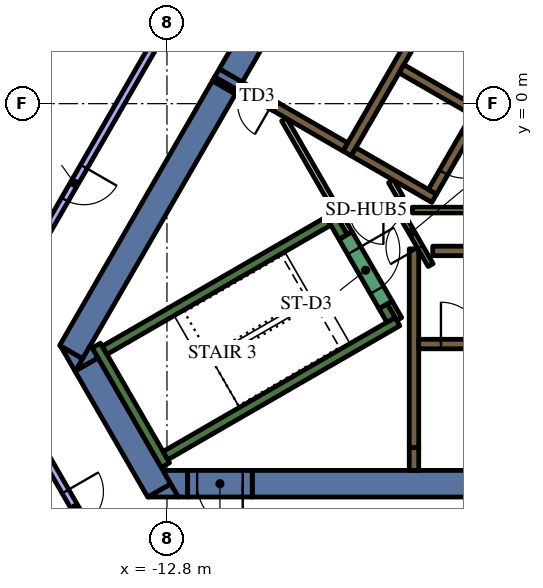
"""IFC4 building model, lengths in metres.
Left out: names, types, materials, properties, quantities, classifications, styles, units other than length and angle.
Written with IfcOpenShell. Run it as: python <this file> out.ifc"""

import sys

from ifc_helpers import new_model, si_unit, direction, frame, frame_2d, origin, place, context, subcontext, project, spatial, polyline, rectangle, outline, extrude, element, fill, save


model = new_model("IFC4")
c1 = context("Model", 3, precision=1e-05, world=origin(), true_north=direction((0.0, 1.0)))
c2 = subcontext(c1, "Body", "Model", "MODEL_VIEW")
j1 = project(units=[si_unit("LENGTHUNIT", "METRE"), si_unit("PLANEANGLEUNIT", "RADIAN")], contexts=[c1])
p1 = place(None, origin())
s1 = spatial("IfcSite", under=j1, at=p1, CompositionType="ELEMENT")
p2 = place(p1, origin())
s2 = spatial("IfcBuilding", under=s1, at=p2, CompositionType="ELEMENT")
p3 = place(p2, frame((0.0, 0.0, 210.0)))
s3 = spatial("IfcBuildingStorey", under=s2, at=p3, CompositionType="ELEMENT", Elevation=210.0)
p4 = place(p3, frame((-11.301, 0.426, 0.0), z_axis=(0.0, 0.0, 1.0), x_axis=(0.50111559984, 0.865380353138, 0.0)))
e1 = element("IfcWall", 1, at=p4, inside=s3, PredefinedType="SOLIDWALL", context=c2, shape_type="SweptSolid", body=[
    extrude(rectangle(XDim=0.121, YDim=0.7, at=frame_2d((0.061, 0.0))), origin(), (0.0, 0.0, 1.0), 4.2),
])
p5 = place(p3, frame((-15.321, -6.537, 0.0), z_axis=(0.0, 0.0, 1.0), x_axis=(0.500000268222, 0.866025248926, 0.0)))
e2 = element("IfcWall", 2, at=p5, inside=s3, PredefinedType="SOLIDWALL", context=c2, shape_type="SweptSolid", body=[
    extrude(rectangle(XDim=8.038, YDim=0.7, at=frame_2d((4.019, 0.0))), origin(), (0.0, 0.0, 1.0), 4.2),
])
p6 = place(p3, origin())
e3 = element("IfcWall", 3, at=p6, inside=s3, PredefinedType="SOLIDWALL", context=c2, shape_type="SweptSolid", body=[
    extrude(outline(polyline([(-15.213, -7.05), (-15.601, -6.378), (-15.019, -6.714), (-15.213, -7.05)])), origin(), (0.0, 0.0, 1.0), 4.2),
])
p7 = place(p3, frame((-4.696, 11.867, 0.0), z_axis=(0.0, 0.0, 1.0), x_axis=(-0.500003726532, -0.866023252259, 0.0)))
e4 = element("IfcWall", 4, at=p7, inside=s3, PredefinedType="SOLIDWALL", context=c2, shape_type="SweptSolid", body=[
    extrude(rectangle(XDim=12.848, YDim=0.7, at=frame_2d((6.424, 0.0))), origin(), (0.0, 0.0, 1.0), 4.2),
])
e5 = element("IfcWall", 5, at=p6, inside=s3, PredefinedType="SOLIDWALL", context=c2, shape_type="SweptSolid", body=[
    extrude(outline(polyline([(-11.543, 0.708), (-11.424, 0.914), (-10.843, 0.578), (-10.962, 0.372), (-11.543, 0.708)])), origin(), (0.0, 0.0, 1.0), 4.2),
])
p8 = place(p3, frame((-14.917, -6.863, 0.0), z_axis=(0.0, 0.0, 1.0), x_axis=(0.499972675833, -0.866041178825, 0.0)))
e6 = element("IfcWall", 6, at=p8, inside=s3, PredefinedType="SOLIDWALL", context=c2, shape_type="SweptSolid", body=[
    extrude(rectangle(XDim=3.829, YDim=0.7, at=frame_2d((1.915, 0.0))), origin(), (0.0, 0.0, 1.0), 4.2),
])
e7 = element("IfcWall", 7, at=p6, inside=s3, PredefinedType="SOLIDWALL", context=c2, shape_type="SweptSolid", body=[
    extrude(outline(polyline([(-14.809, -6.35), (-14.615, -6.686), (-15.197, -7.022), (-14.809, -6.35)])), origin(), (0.0, 0.0, 1.0), 4.2),
])
e8 = element("IfcWall", 8, at=p6, inside=s3, PredefinedType="SOLIDWALL", context=c2, shape_type="SweptSolid", body=[
    extrude(outline(polyline([(-12.5, -10.35), (-13.296, -10.35), (-12.698, -10.005), (-12.5, -10.35)])), origin(), (0.0, 0.0, 1.0), 4.2),
])
e9 = element("IfcWall", 9, at=p6, inside=s3, PredefinedType="SOLIDWALL", context=c2, shape_type="SweptSolid", body=[
    extrude(outline(polyline([(-12.257, -10.35), (-12.5, -10.35), (-12.904, -9.65), (-12.257, -9.65), (-12.257, -10.35)])), origin(), (0.0, 0.0, 1.0), 4.2),
])
p9 = place(p3, frame((-10.556, -10.0, 0.0), z_axis=(0.0, 0.0, 1.0), x_axis=(1.0, 0.0, 0.0)))
e10 = element("IfcWall", 10, at=p9, inside=s3, PredefinedType="SOLIDWALL", context=c2, shape_type="SweptSolid", body=[
    extrude(rectangle(XDim=19.461, YDim=0.7, at=frame_2d((9.73, 0.0))), origin(), (0.0, 0.0, 1.0), 4.2),
])
p10 = place(p3, frame((-12.84, -9.511, 0.0), z_axis=(0.0, 0.0, 1.0), x_axis=(-0.500048121057, 0.865997619297, 0.0)))
e11 = element("IfcWall", 11, at=p10, inside=s3, PredefinedType="SOLIDWALL", context=c2, shape_type="SweptSolid", body=[
    extrude(rectangle(XDim=3.634, YDim=0.25, at=frame_2d((1.817, 0.0))), origin(), (0.0, 0.0, 1.0), 4.2),
])
p11 = place(p3, frame((-14.44, -6.49, 0.0), z_axis=(0.0, 0.0, 1.0), x_axis=(0.866022966069, 0.500004222222, 0.0)))
e12 = element("IfcWall", 12, at=p11, inside=s3, PredefinedType="SOLIDWALL", context=c2, shape_type="SweptSolid", body=[
    extrude(rectangle(XDim=6.8, YDim=0.25, at=frame_2d((3.4, 0.0))), origin(), (0.0, 0.0, 1.0), 4.2),
])
p12 = place(p3, frame((-8.163, -3.511, 0.0), z_axis=(0.0, 0.0, 1.0), x_axis=(-0.499994068514, 0.866028828302, 0.0)))
e13 = element("IfcWall", 13, at=p12, inside=s3, PredefinedType="SOLIDWALL", context=c2, shape_type="SweptSolid", body=[
    extrude(rectangle(XDim=0.674, YDim=0.25, at=frame_2d((0.337, 0.0))), origin(), (0.0, 0.0, 1.0), 4.2),
])
p13 = place(p3, frame((-12.84, -9.261, 0.0), z_axis=(0.0, 0.0, 1.0), x_axis=(0.866016039709, 0.500016218704, 0.0)))
e14 = element("IfcWall", 14, at=p13, inside=s3, PredefinedType="SOLIDWALL", context=c2, shape_type="SweptSolid", body=[
    extrude(rectangle(XDim=7.05, YDim=0.25, at=frame_2d((3.525, 0.0))), origin(), (0.0, 0.0, 1.0), 4.2),
])
p14 = place(p3, frame((-6.905, -5.69, 0.0), z_axis=(0.0, 0.0, 1.0), x_axis=(-0.499993700073, 0.866029041019, 0.0)))
e15 = element("IfcWall", 15, at=p14, inside=s3, PredefinedType="SOLIDWALL", context=c2, shape_type="SweptSolid", body=[
    extrude(rectangle(XDim=0.416, YDim=0.25, at=frame_2d((0.208, 0.0))), origin(), (0.0, 0.0, 1.0), 4.2),
])
p15 = place(p3, frame((-6.3, -9.05, 0.0), z_axis=(0.0, 0.0, 1.0), x_axis=(0.0, 1.0, 0.0)))
e16 = element("IfcWall", 16, at=p15, inside=s3, PredefinedType="SOLIDWALL", context=c2, shape_type="SweptSolid", body=[
    extrude(rectangle(XDim=5.23, YDim=0.25, at=frame_2d((2.615, 0.0))), origin(), (0.0, 0.0, 1.0), 4.2),
])
p16 = place(p3, frame((-6.3, -9.052, 0.0), z_axis=(0.0, 0.0, 1.0), x_axis=(0.0, -1.0, 0.0)))
e17 = element("IfcWall", 17, at=p16, inside=s3, PredefinedType="SOLIDWALL", context=c2, shape_type="SweptSolid", body=[
    extrude(rectangle(XDim=0.598, YDim=0.25, at=frame_2d((0.299, 0.0))), origin(), (0.0, 0.0, 1.0), 4.2),
])
p17 = place(p3, frame((-5.806, -3.875, 0.0), z_axis=(0.0, 0.0, 1.0), x_axis=(1.0, 0.0, 0.0)))
e18 = element("IfcWall", 18, at=p17, inside=s3, PredefinedType="SOLIDWALL", context=c2, shape_type="SweptSolid", body=[
    extrude(rectangle(XDim=12.231, YDim=0.25, at=frame_2d((6.116, 0.0))), origin(), (0.0, 0.0, 1.0), 4.2),
])
p18 = place(p3, frame((-8.06, -1.311, 0.0), z_axis=(0.0, 0.0, 1.0), x_axis=(0.50000273126, 0.866023826885, 0.0)))
e19 = element("IfcWall", 19, at=p18, inside=s3, PredefinedType="SOLIDWALL", context=c2, shape_type="SweptSolid", body=[
    extrude(rectangle(XDim=10.33, YDim=0.25, at=frame_2d((5.165, 0.0))), origin(), (0.0, 0.0, 1.0), 4.2),
])
p19 = place(p3, frame((-4.724, -0.182, 0.0), z_axis=(0.0, 0.0, 1.0), x_axis=(-0.866008176907, 0.50002983664, 0.0)))
e20 = element("IfcWall", 20, at=p19, inside=s3, PredefinedType="SOLIDWALL", context=c2, shape_type="SweptSolid", body=[
    extrude(rectangle(XDim=2.2, YDim=0.25, at=frame_2d((1.1, 0.0))), origin(), (0.0, 0.0, 1.0), 4.2),
])
p20 = place(p3, frame((-7.889, -1.265, 0.0), z_axis=(0.0, 0.0, 1.0), x_axis=(0.866057815567, -0.499943856944, 0.0)))
e21 = element("IfcWall", 21, at=p20, inside=s3, PredefinedType="SOLIDWALL", context=c2, shape_type="SweptSolid", body=[
    extrude(rectangle(XDim=2.45, YDim=0.25, at=frame_2d((1.225, 0.0))), origin(), (0.0, 0.0, 1.0), 4.2),
])
p21 = place(p3, frame((-9.95, -0.075, 0.0), z_axis=(0.0, 0.0, 1.0), x_axis=(0.865962177421, -0.500109495288, 0.0)))
e22 = element("IfcWall", 22, at=p21, inside=s3, PredefinedType="SOLIDWALL", context=c2, shape_type="SweptSolid", body=[
    extrude(rectangle(XDim=2.129, YDim=0.25, at=frame_2d((1.065, 0.0))), origin(), (0.0, 0.0, 1.0), 4.2),
])
p22 = place(p3, frame((-9.718, -0.417, 0.0), z_axis=(0.0, 0.0, 1.0), x_axis=(0.499966538646, -0.866044721844, 0.0)))
e23 = element("IfcWall", 23, at=p22, inside=s3, PredefinedType="PARTITIONING", context=c2, shape_type="SweptSolid", body=[
    extrude(rectangle(XDim=2.511, YDim=0.15, at=frame_2d((1.255, 0.0))), origin(), (0.0, 0.0, 1.0), 3.45),
])
p23 = place(p3, frame((1.438, -2.8, 0.0), z_axis=(0.0, 0.0, 1.0), x_axis=(-1.0, 0.0, 0.0)))
e24 = element("IfcWall", 24, at=p23, inside=s3, PredefinedType="PARTITIONING", context=c2, shape_type="SweptSolid", body=[
    extrude(rectangle(XDim=7.781, YDim=0.15, at=frame_2d((3.891, 0.0))), origin(), (0.0, 0.0, 1.0), 3.45),
])
p24 = place(p3, frame((-6.653, -2.477, 0.0), z_axis=(0.0, 0.0, 1.0), x_axis=(-0.500002592159, 0.866023907196, 0.0)))
e25 = element("IfcWall", 25, at=p24, inside=s3, PredefinedType="PARTITIONING", context=c2, shape_type="SweptSolid", body=[
    extrude(rectangle(XDim=0.503, YDim=0.15, at=frame_2d((0.251, 0.0))), origin(), (0.0, 0.0, 1.0), 3.45),
])
p25 = place(p3, frame((-7.99, -3.412, 0.0), z_axis=(0.0, 0.0, 1.0), x_axis=(-0.499858525911, 0.866107068482, 0.0)))
e26 = element("IfcWall", 26, at=p25, inside=s3, PredefinedType="PARTITIONING", context=c2, shape_type="SweptSolid", body=[
    extrude(rectangle(XDim=0.466, YDim=0.15, at=frame_2d((0.233, 0.0))), origin(), (0.0, 0.0, 1.0), 3.45),
])
p26 = place(p3, frame((-6.94, -5.23, 0.0), z_axis=(0.0, 0.0, 1.0), x_axis=(0.499834152157, -0.86612113491, 0.0)))
e27 = element("IfcWall", 27, at=p26, inside=s3, PredefinedType="PARTITIONING", context=c2, shape_type="SweptSolid", body=[
    extrude(rectangle(XDim=0.505, YDim=0.15, at=frame_2d((0.252, 0.0))), origin(), (0.0, 0.0, 1.0), 4.2),
])
p27 = place(p3, frame((-6.175, -6.325, 0.0), z_axis=(0.0, 0.0, 1.0), x_axis=(1.0, 0.0, 0.0)))
e28 = element("IfcWall", 28, at=p27, inside=s3, PredefinedType="SOLIDWALL", context=c2, shape_type="SweptSolid", body=[
    extrude(rectangle(XDim=12.35, YDim=0.25, at=frame_2d((6.175, 0.0))), origin(), (0.0, 0.0, 1.0), 4.2),
])
p28 = place(p27, frame((0.585, 0.0, 0.0)))
e29 = element("IfcOpeningElement", 29, at=p28, cuts=e28, PredefinedType="OPENING", context=c2, shape_type="SweptSolid", body=[
    extrude(rectangle(XDim=1.1, YDim=2.1, at=frame_2d((0.55, 1.05))), frame((0.0, 0.135, 0.0), z_axis=(0.0, -1.0, 0.0), x_axis=(1.0, 0.0, 0.0)), (0.0, 0.0, 1.0), 0.27),
])
p29 = place(p27, frame((3.105, 0.0, 0.0)))
e30 = element("IfcOpeningElement", 30, at=p29, cuts=e28, PredefinedType="OPENING", context=c2, shape_type="SweptSolid", body=[
    extrude(rectangle(XDim=1.1, YDim=2.1, at=frame_2d((0.55, 1.05))), frame((0.0, 0.135, 0.0), z_axis=(0.0, -1.0, 0.0), x_axis=(1.0, 0.0, 0.0)), (0.0, 0.0, 1.0), 0.27),
])
p30 = place(p27, frame((5.625, 0.0, 0.0)))
e31 = element("IfcOpeningElement", 31, at=p30, cuts=e28, PredefinedType="OPENING", context=c2, shape_type="SweptSolid", body=[
    extrude(rectangle(XDim=1.1, YDim=2.1, at=frame_2d((0.55, 1.05))), frame((0.0, 0.135, 0.0), z_axis=(0.0, -1.0, 0.0), x_axis=(1.0, 0.0, 0.0)), (0.0, 0.0, 1.0), 0.27),
])
p31 = place(p27, frame((8.145, 0.0, 0.0)))
e32 = element("IfcOpeningElement", 32, at=p31, cuts=e28, PredefinedType="OPENING", context=c2, shape_type="SweptSolid", body=[
    extrude(rectangle(XDim=1.1, YDim=2.1, at=frame_2d((0.55, 1.05))), frame((0.0, 0.135, 0.0), z_axis=(0.0, -1.0, 0.0), x_axis=(1.0, 0.0, 0.0)), (0.0, 0.0, 1.0), 0.27),
])
p32 = place(p27, frame((10.665, 0.0, 0.0)))
e33 = element("IfcOpeningElement", 33, at=p32, cuts=e28, PredefinedType="OPENING", context=c2, shape_type="SweptSolid", body=[
    extrude(rectangle(XDim=1.1, YDim=2.1, at=frame_2d((0.55, 1.05))), frame((0.0, 0.135, 0.0), z_axis=(0.0, -1.0, 0.0), x_axis=(1.0, 0.0, 0.0)), (0.0, 0.0, 1.0), 0.27),
])
p33 = place(p3, frame((-0.898, 6.194, 0.0), z_axis=(0.0, 0.0, 1.0), x_axis=(-0.499996202215, -0.866027596426, 0.0)))
e34 = element("IfcWall", 34, at=p33, inside=s3, PredefinedType="SOLIDWALL", context=c2, shape_type="SweptSolid", body=[
    extrude(rectangle(XDim=9.83, YDim=0.25, at=frame_2d((4.915, 0.0))), origin(), (0.0, 0.0, 1.0), 4.2),
])
p34 = place(p33, frame((0.585, 0.0, 0.0)))
e35 = element("IfcOpeningElement", 35, at=p34, cuts=e34, PredefinedType="OPENING", context=c2, shape_type="SweptSolid", body=[
    extrude(rectangle(XDim=1.1, YDim=2.1, at=frame_2d((0.55, 1.05))), frame((0.0, 0.135, 0.0), z_axis=(0.0, -1.0, 0.0), x_axis=(1.0, 0.0, 0.0)), (0.0, 0.0, 1.0), 0.27),
])
p35 = place(p33, frame((3.105, 0.0, 0.0)))
e36 = element("IfcOpeningElement", 36, at=p35, cuts=e34, PredefinedType="OPENING", context=c2, shape_type="SweptSolid", body=[
    extrude(rectangle(XDim=1.1, YDim=2.1, at=frame_2d((0.55, 1.05))), frame((0.0, 0.135, 0.0), z_axis=(0.0, -1.0, 0.0), x_axis=(1.0, 0.0, 0.0)), (0.0, 0.0, 1.0), 0.27),
])
p36 = place(p33, frame((5.625, 0.0, 0.0)))
e37 = element("IfcOpeningElement", 37, at=p36, cuts=e34, PredefinedType="OPENING", context=c2, shape_type="SweptSolid", body=[
    extrude(rectangle(XDim=1.1, YDim=2.1, at=frame_2d((0.55, 1.05))), frame((0.0, 0.135, 0.0), z_axis=(0.0, -1.0, 0.0), x_axis=(1.0, 0.0, 0.0)), (0.0, 0.0, 1.0), 0.27),
])
p37 = place(p33, frame((8.145, 0.0, 0.0)))
e38 = element("IfcOpeningElement", 38, at=p37, cuts=e34, PredefinedType="OPENING", context=c2, shape_type="SweptSolid", body=[
    extrude(rectangle(XDim=1.1, YDim=2.1, at=frame_2d((0.55, 1.05))), frame((0.0, 0.135, 0.0), z_axis=(0.0, -1.0, 0.0), x_axis=(1.0, 0.0, 0.0)), (0.0, 0.0, 1.0), 0.27),
])
p38 = place(p3, frame((-8.098, -3.474, 0.0), z_axis=(0.0, 0.0, 1.0), x_axis=(0.49994051562, -0.866059744384, 0.0)))
e39 = element("IfcWall", 39, at=p38, inside=s3, PredefinedType="SOLIDWALL", context=c2, shape_type="SweptSolid", body=[
    extrude(rectangle(XDim=2.1, YDim=0.4, at=frame_2d((1.05, 0.0))), origin(), (0.0, 0.0, 1.0), 4.2),
])
p39 = place(p38, frame((0.45, 0.0, 0.0)))
e40 = element("IfcOpeningElement", 40, at=p39, cuts=e39, PredefinedType="OPENING", context=c2, shape_type="SweptSolid", body=[
    extrude(rectangle(XDim=1.2, YDim=2.1, at=frame_2d((0.6, 1.05))), frame((0.0, 0.21, 0.0), z_axis=(0.0, -1.0, 0.0), x_axis=(1.0, 0.0, 0.0)), (0.0, 0.0, 1.0), 0.42),
])
p40 = place(p3, frame((-5.861, -4.248, 0.0), z_axis=(0.0, 0.0, 1.0), x_axis=(-0.500043646338, 0.866000203093, 0.0)))
e41 = element("IfcWall", 41, at=p40, inside=s3, PredefinedType="PARTITIONING", context=c2, shape_type="SweptSolid", body=[
    extrude(rectangle(XDim=1.93, YDim=0.15, at=frame_2d((0.965, 0.0))), origin(), (0.0, 0.0, 1.0), 4.2),
])
p41 = place(p40, frame((0.55, 0.0, 0.0)))
e42 = element("IfcOpeningElement", 42, at=p41, cuts=e41, PredefinedType="OPENING", context=c2, shape_type="SweptSolid", body=[
    extrude(rectangle(XDim=0.9, YDim=2.1, at=frame_2d((0.45, 1.05))), frame((0.0, 0.085, 0.0), z_axis=(0.0, -1.0, 0.0), x_axis=(1.0, 0.0, 0.0)), (0.0, 0.0, 1.0), 0.17),
])
p42 = place(p3, frame((-10.556, -10.0, 0.0), z_axis=(0.0, 0.0, 1.0), x_axis=(-1.0, 0.0, 0.0)))
e43 = element("IfcWall", 43, at=p42, inside=s3, PredefinedType="SOLIDWALL", context=c2, shape_type="SweptSolid", body=[
    extrude(rectangle(XDim=1.7, YDim=0.7, at=frame_2d((0.85, 0.0))), origin(), (0.0, 0.0, 1.0), 4.2),
])
p43 = place(p42, frame((0.25, 0.0, 0.0)))
e44 = element("IfcOpeningElement", 44, at=p43, cuts=e43, PredefinedType="OPENING", context=c2, shape_type="SweptSolid", body=[
    extrude(rectangle(XDim=1.2, YDim=2.1, at=frame_2d((0.6, 1.05))), frame((0.0, 0.36, 0.0), z_axis=(0.0, -1.0, 0.0), x_axis=(1.0, 0.0, 0.0)), (0.0, 0.0, 1.0), 0.72),
])
p44 = place(p3, frame((-6.655, -2.8, 0.0), z_axis=(0.0, 0.0, 1.0), x_axis=(-1.0, 0.0, 0.0)))
e45 = element("IfcWall", 45, at=p44, inside=s3, PredefinedType="PARTITIONING", context=c2, shape_type="SweptSolid", body=[
    extrude(rectangle(XDim=1.8, YDim=0.15, at=frame_2d((0.9, 0.0))), origin(), (0.0, 0.0, 1.0), 3.45),
])
p45 = place(p44, frame((0.45, 0.0, 0.0)))
e46 = element("IfcOpeningElement", 46, at=p45, cuts=e45, PredefinedType="OPENING", context=c2, shape_type="SweptSolid", body=[
    extrude(rectangle(XDim=0.9, YDim=2.1, at=frame_2d((0.45, 1.05))), frame((0.0, 0.085, 0.0), z_axis=(0.0, -1.0, 0.0), x_axis=(1.0, 0.0, 0.0)), (0.0, 0.0, 1.0), 0.17),
])
p46 = place(p3, frame((-9.95, -0.075, 0.0), z_axis=(0.0, 0.0, 1.0), x_axis=(-0.865952669392, 0.500125958508, 0.0)))
e47 = element("IfcWall", 47, at=p46, inside=s3, PredefinedType="SOLIDWALL", context=c2, shape_type="SweptSolid", body=[
    extrude(rectangle(XDim=1.1, YDim=0.25, at=frame_2d((0.55, 0.0))), origin(), (0.0, 0.0, 1.0), 4.2),
])
p47 = place(p46, frame((0.1, 0.0, 0.0)))
e48 = element("IfcOpeningElement", 48, at=p47, cuts=e47, PredefinedType="OPENING", context=c2, shape_type="SweptSolid", body=[
    extrude(rectangle(XDim=0.9, YDim=2.1, at=frame_2d((0.45, 1.05))), frame((0.0, 0.135, 0.0), z_axis=(0.0, -1.0, 0.0), x_axis=(1.0, 0.0, 0.0)), (0.0, 0.0, 1.0), 0.27),
])
p48 = place(p3, frame((-12.787, 2.152, 0.0), z_axis=(0.0, 0.0, 1.0), x_axis=(-0.50000660679, -0.866021589319, 0.0)))
e49 = element("IfcWall", 49, at=p48, inside=s3, PredefinedType="PARTITIONING", context=c2, shape_type="SweptSolid", body=[
    extrude(rectangle(XDim=9.817, YDim=0.2, at=frame_2d((4.909, 0.0))), origin(), (0.0, 0.0, 1.0), 3.45),
])
p49 = place(p48, frame((4.4, 0.0, 0.0)))
e50 = element("IfcOpeningElement", 50, at=p49, cuts=e49, PredefinedType="OPENING", context=c2, shape_type="SweptSolid", body=[
    extrude(rectangle(XDim=1.0, YDim=2.1, at=frame_2d((0.5, 1.05))), frame((0.0, 0.11, 0.0), z_axis=(0.0, -1.0, 0.0), x_axis=(1.0, 0.0, 0.0)), (0.0, 0.0, 1.0), 0.22),
])
p50 = place(p3, frame((-15.971, -9.337, 0.0), z_axis=(0.0, 0.0, 1.0), x_axis=(0.500007233661, -0.866021227388, 0.0)))
e51 = element("IfcWall", 51, at=p50, inside=s3, PredefinedType="PARTITIONING", context=c2, shape_type="SweptSolid", body=[
    extrude(rectangle(XDim=2.919, YDim=0.2, at=frame_2d((1.459, 0.0))), origin(), (0.0, 0.0, 1.0), 3.45),
])
p51 = place(p50, frame((1.0, 0.0, 0.0)))
e52 = element("IfcOpeningElement", 52, at=p51, cuts=e51, PredefinedType="OPENING", context=c2, shape_type="SweptSolid", body=[
    extrude(rectangle(XDim=1.0, YDim=2.1, at=frame_2d((0.5, 1.05))), frame((0.0, 0.11, 0.0), z_axis=(0.0, -1.0, 0.0), x_axis=(1.0, 0.0, 0.0)), (0.0, 0.0, 1.0), 0.22),
])
p52 = place(p28, origin())
e53 = element("IfcDoor", 53, at=p52, inside=s3, OperationType="DOUBLE_DOOR_SLIDING", PredefinedType="DOOR", context=c2, shape_type="SweptSolid", body=[
    extrude(rectangle(XDim=1.1, YDim=2.1, at=frame_2d((0.55, 1.05))), frame((0.0, 0.025, 0.0), z_axis=(0.0, -1.0, 0.0), x_axis=(1.0, 0.0, 0.0)), (0.0, 0.0, 1.0), 0.05),
])
fill(e29, e53)
p53 = place(p37, origin())
e54 = element("IfcDoor", 54, at=p53, inside=s3, OperationType="DOUBLE_DOOR_SLIDING", PredefinedType="DOOR", context=c2, shape_type="SweptSolid", body=[
    extrude(rectangle(XDim=1.1, YDim=2.1, at=frame_2d((0.55, 1.05))), frame((0.0, 0.025, 0.0), z_axis=(0.0, -1.0, 0.0), x_axis=(1.0, 0.0, 0.0)), (0.0, 0.0, 1.0), 0.05),
])
fill(e38, e54)
p54 = place(p39, origin())
e55 = element("IfcDoor", 55, at=p54, inside=s3, OperationType="SINGLE_SWING_LEFT", PredefinedType="DOOR", context=c2, shape_type="SweptSolid", body=[
    extrude(rectangle(XDim=1.2, YDim=2.1, at=frame_2d((0.6, 1.05))), frame((0.0, 0.025, 0.0), z_axis=(0.0, -1.0, 0.0), x_axis=(1.0, 0.0, 0.0)), (0.0, 0.0, 1.0), 0.05),
])
fill(e40, e55)
p55 = place(p41, origin())
e56 = element("IfcDoor", 56, at=p55, inside=s3, OperationType="SINGLE_SWING_LEFT", PredefinedType="DOOR", context=c2, shape_type="SweptSolid", body=[
    extrude(rectangle(XDim=0.9, YDim=2.1, at=frame_2d((0.45, 1.05))), frame((0.0, 0.025, 0.0), z_axis=(0.0, -1.0, 0.0), x_axis=(1.0, 0.0, 0.0)), (0.0, 0.0, 1.0), 0.05),
])
fill(e42, e56)
p56 = place(p43, origin())
e57 = element("IfcDoor", 57, at=p56, inside=s3, OperationType="SINGLE_SWING_LEFT", PredefinedType="DOOR", context=c2, shape_type="SweptSolid", body=[
    extrude(rectangle(XDim=1.2, YDim=2.1, at=frame_2d((0.6, 1.05))), frame((0.0, 0.025, 0.0), z_axis=(0.0, -1.0, 0.0), x_axis=(1.0, 0.0, 0.0)), (0.0, 0.0, 1.0), 0.05),
])
fill(e44, e57)
p57 = place(p45, origin())
e58 = element("IfcDoor", 58, at=p57, inside=s3, OperationType="SINGLE_SWING_LEFT", PredefinedType="DOOR", context=c2, shape_type="SweptSolid", body=[
    extrude(rectangle(XDim=0.9, YDim=2.1, at=frame_2d((0.45, 1.05))), frame((0.0, 0.025, 0.0), z_axis=(0.0, -1.0, 0.0), x_axis=(1.0, 0.0, 0.0)), (0.0, 0.0, 1.0), 0.05),
])
fill(e46, e58)
p58 = place(p47, origin())
e59 = element("IfcDoor", 59, at=p58, inside=s3, OperationType="SINGLE_SWING_LEFT", PredefinedType="DOOR", context=c2, shape_type="SweptSolid", body=[
    extrude(rectangle(XDim=0.9, YDim=2.1, at=frame_2d((0.45, 1.05))), frame((0.0, 0.025, 0.0), z_axis=(0.0, -1.0, 0.0), x_axis=(1.0, 0.0, 0.0)), (0.0, 0.0, 1.0), 0.05),
])
fill(e48, e59)
p59 = place(p49, origin())
e60 = element("IfcDoor", 60, at=p59, inside=s3, OperationType="SINGLE_SWING_LEFT", PredefinedType="DOOR", context=c2, shape_type="SweptSolid", body=[
    extrude(rectangle(XDim=1.0, YDim=2.1, at=frame_2d((0.5, 1.05))), frame((0.0, 0.025, 0.0), z_axis=(0.0, -1.0, 0.0), x_axis=(1.0, 0.0, 0.0)), (0.0, 0.0, 1.0), 0.05),
])
fill(e50, e60)
p60 = place(p51, origin())
e61 = element("IfcDoor", 61, at=p60, inside=s3, OperationType="SINGLE_SWING_RIGHT", PredefinedType="DOOR", context=c2, shape_type="SweptSolid", body=[
    extrude(rectangle(XDim=1.0, YDim=2.1, at=frame_2d((0.5, 1.05))), frame((0.0, 0.025, 0.0), z_axis=(0.0, -1.0, 0.0), x_axis=(1.0, 0.0, 0.0)), (0.0, 0.0, 1.0), 0.05),
])
fill(e52, e61)
save(model, sys.argv[1])
